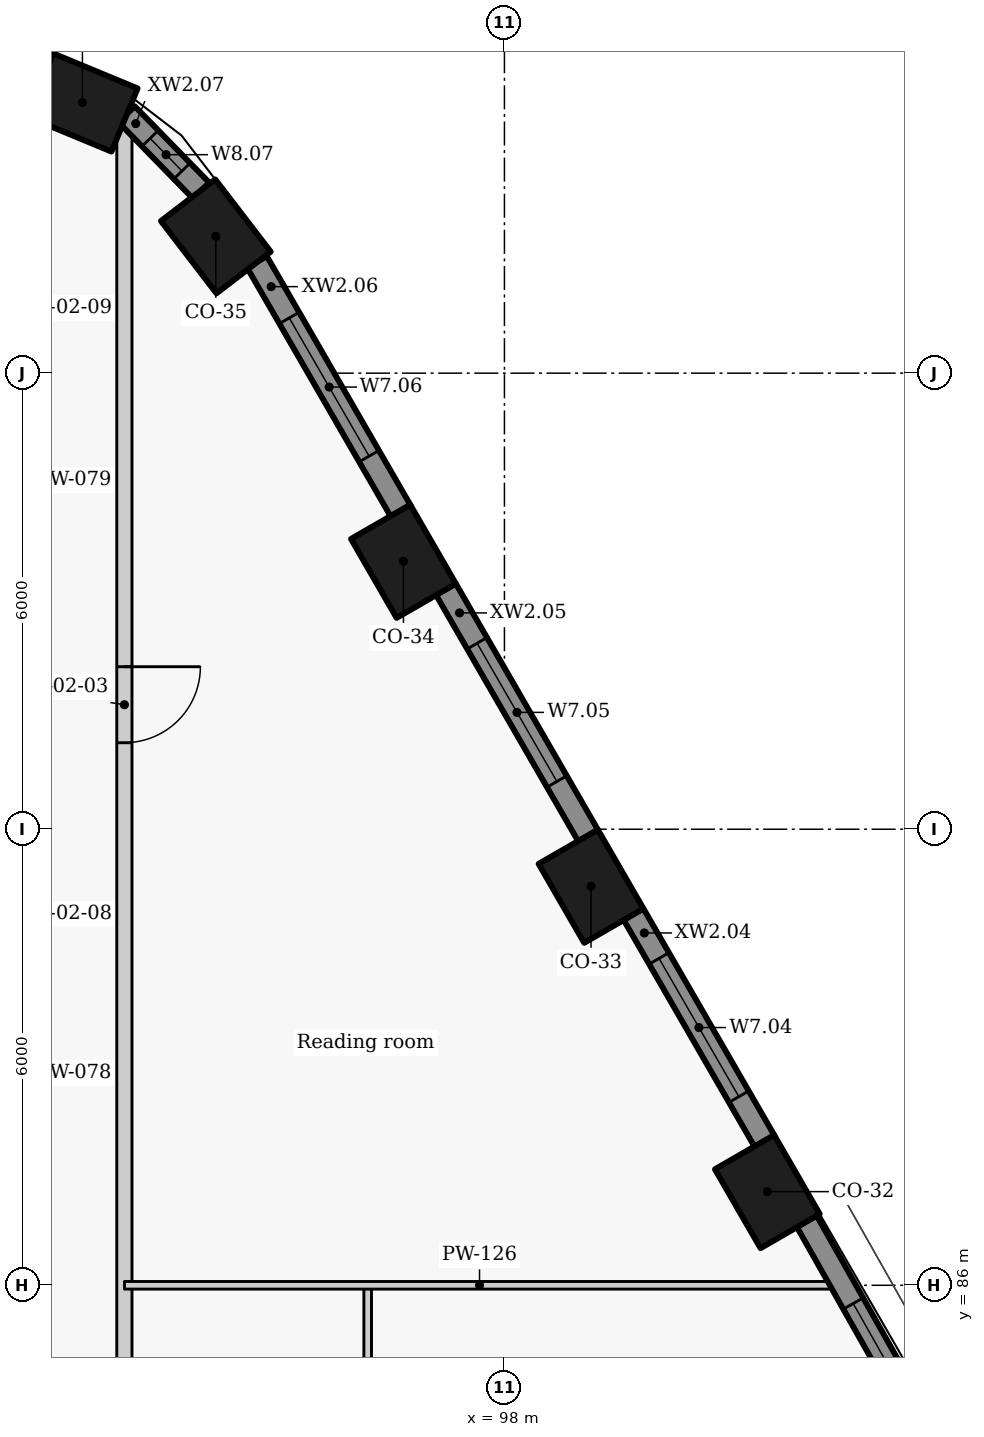
"""IFC4 building model, lengths in metres.
Left out: names, types, materials, properties, quantities, classifications, styles, units other than length and angle.
Written with IfcOpenShell. Run it as: python <this file> out.ifc"""

import sys

from ifc_helpers import new_model, si_unit, direction, frame, frame_2d, origin, origin_2d, place, context, subcontext, project, spatial, rectangle, extrude, element, fill, save


model = new_model("IFC4")
c1 = context("Model", 3, precision=1e-05, world=origin(), true_north=direction((0.0, 1.0)))
c2 = subcontext(c1, "Body", "Model", "MODEL_VIEW")
j1 = project(units=[si_unit("LENGTHUNIT", "METRE"), si_unit("PLANEANGLEUNIT", "RADIAN")], contexts=[c1])
p1 = place(None, origin())
s1 = spatial("IfcSite", under=j1, at=p1, CompositionType="ELEMENT")
p2 = place(p1, origin())
s2 = spatial("IfcBuilding", under=s1, at=p2, CompositionType="ELEMENT")
p3 = place(p2, frame((0.0, 0.0, 203.1)))
s3 = spatial("IfcBuildingStorey", under=s2, at=p3, CompositionType="ELEMENT", Elevation=203.1)
for number, where, z_axis, x_axis in (
    (1, (101.459, 87.232, 0.0), (0.0, 0.0, 1.0), (-0.5, 0.866, 0.0)),
    (2, (99.139, 91.25, 0.0), (0.0, 0.0, 1.0), (-0.5, 0.866, 0.0)),
    (3, (96.671, 95.525, 0.0), (0.0, 0.0, 1.0), (-0.5, 0.866, 0.0)),
    (4, (94.203, 99.8, 0.0), (0.0, 0.0, 1.0), (-0.609, 0.793, 0.0)),
    (5, (92.448, 101.56, 0.0), (0.0, 0.0, 1.0), (-0.924, 0.383, 0.0)),
):
    element("IfcColumn", number, at=place(p3, frame(where, z_axis=z_axis, x_axis=x_axis)), inside=s3, PredefinedType="COLUMN", context=c2, shape_type="SweptSolid", body=[
        extrude(rectangle(XDim=1.2, YDim=0.9, at=origin_2d()), origin(), (0.0, 0.0, 1.0), 3.3),
    ])
p4 = place(p3, frame((104.627, 82.154, 0.0), z_axis=(0.0, 0.0, 1.0), x_axis=(-0.492033360928, 0.870576344575, 0.0)))
e6 = element("IfcWall", 6, at=p4, inside=s3, PredefinedType="SOLIDWALL", context=c2, shape_type="SweptSolid", body=[
    extrude(rectangle(XDim=5.387, YDim=0.3, at=frame_2d((2.693, 0.0))), origin(), (0.0, 0.0, 1.0), 2.425),
])
p5 = place(p4, frame((2.043, 0.0, 0.9)))
e7 = element("IfcOpeningElement", 7, at=p5, cuts=e6, PredefinedType="OPENING", context=c2, shape_type="SweptSolid", body=[
    extrude(rectangle(XDim=2.1, YDim=1.1, at=frame_2d((1.05, 0.55))), frame((0.0, 0.16, 0.0), z_axis=(0.0, -1.0, 0.0), x_axis=(1.0, 0.0, 0.0)), (0.0, 0.0, 1.0), 0.32),
])
p6 = place(p3, frame((101.421, 87.898, 0.0), z_axis=(0.0, 0.0, 1.0), x_axis=(-0.499955427682, 0.866051136095, 0.0)))
e8 = element("IfcWall", 8, at=p6, inside=s3, PredefinedType="SOLIDWALL", context=c2, shape_type="SweptSolid", body=[
    extrude(rectangle(XDim=3.447, YDim=0.3, at=frame_2d((1.724, 0.0))), origin(), (0.0, 0.0, 1.0), 2.425),
])
p7 = place(p6, frame((0.674, 0.0, 0.9)))
e9 = element("IfcOpeningElement", 9, at=p7, cuts=e8, PredefinedType="OPENING", context=c2, shape_type="SweptSolid", body=[
    extrude(rectangle(XDim=2.1, YDim=1.1, at=frame_2d((1.05, 0.55))), frame((0.0, 0.16, 0.0), z_axis=(0.0, -1.0, 0.0), x_axis=(1.0, 0.0, 0.0)), (0.0, 0.0, 1.0), 0.32),
])
p8 = place(p3, frame((99.101, 91.916, 0.0), z_axis=(0.0, 0.0, 1.0), x_axis=(-0.500059225181, 0.86599120741, 0.0)))
e10 = element("IfcWall", 10, at=p8, inside=s3, PredefinedType="SOLIDWALL", context=c2, shape_type="SweptSolid", body=[
    extrude(rectangle(XDim=3.744, YDim=0.3, at=frame_2d((1.872, 0.0))), origin(), (0.0, 0.0, 1.0), 2.425),
])
p9 = place(p8, frame((0.822, 0.0, 0.9)))
e11 = element("IfcOpeningElement", 11, at=p9, cuts=e10, PredefinedType="OPENING", context=c2, shape_type="SweptSolid", body=[
    extrude(rectangle(XDim=2.1, YDim=1.1, at=frame_2d((1.05, 0.55))), frame((0.0, 0.16, 0.0), z_axis=(0.0, -1.0, 0.0), x_axis=(1.0, 0.0, 0.0)), (0.0, 0.0, 1.0), 0.32),
])
p10 = place(p3, frame((96.633, 96.191, 0.0), z_axis=(0.0, 0.0, 1.0), x_axis=(-0.499961087031, 0.866047869032, 0.0)))
e12 = element("IfcWall", 12, at=p10, inside=s3, PredefinedType="SOLIDWALL", context=c2, shape_type="SweptSolid", body=[
    extrude(rectangle(XDim=3.779, YDim=0.3, at=frame_2d((1.889, 0.0))), origin(), (0.0, 0.0, 1.0), 2.425),
])
p11 = place(p10, frame((0.828, 0.0, 0.9)))
e13 = element("IfcOpeningElement", 13, at=p11, cuts=e12, PredefinedType="OPENING", context=c2, shape_type="SweptSolid", body=[
    extrude(rectangle(XDim=2.1, YDim=1.1, at=frame_2d((1.05, 0.55))), frame((0.0, 0.16, 0.0), z_axis=(0.0, -1.0, 0.0), x_axis=(1.0, 0.0, 0.0)), (0.0, 0.0, 1.0), 0.32),
])
p12 = place(p3, frame((94.009, 100.402, 0.0), z_axis=(0.0, 0.0, 1.0), x_axis=(-0.69817596362, 0.715926199984, 0.0)))
e14 = element("IfcWall", 14, at=p12, inside=s3, PredefinedType="SOLIDWALL", context=c2, shape_type="SweptSolid", body=[
    extrude(rectangle(XDim=1.403, YDim=0.3, at=frame_2d((0.701, 0.0))), origin(), (0.0, 0.0, 1.0), 2.425),
])
p13 = place(p12, frame((0.36, 0.0, 0.9)))
e15 = element("IfcOpeningElement", 15, at=p13, cuts=e14, PredefinedType="OPENING", context=c2, shape_type="SweptSolid", body=[
    extrude(rectangle(XDim=0.6, YDim=1.1, at=frame_2d((0.3, 0.55))), frame((0.0, 0.16, 0.0), z_axis=(0.0, -1.0, 0.0), x_axis=(1.0, 0.0, 0.0)), (0.0, 0.0, 1.0), 0.32),
])
p14 = place(p3, frame((93.0, 101.281, 0.0), z_axis=(0.0, 0.0, 1.0), x_axis=(0.0, -1.0, 0.0)))
e16 = element("IfcWall", 16, at=p14, inside=s3, PredefinedType="PARTITIONING", context=c2, shape_type="SweptSolid", body=[
    extrude(rectangle(XDim=42.606, YDim=0.2, at=frame_2d((21.303, 0.0))), origin(), (0.0, 0.0, 1.0), 2.405),
])
p15 = place(p14, frame((39.33, 0.0, 0.0)))
e17 = element("IfcOpeningElement", 17, at=p15, cuts=e16, PredefinedType="OPENING", context=c2, shape_type="SweptSolid", body=[
    extrude(rectangle(XDim=1.0, YDim=2.1, at=frame_2d((0.5, 1.05))), frame((0.0, 0.11, 0.0), z_axis=(0.0, -1.0, 0.0), x_axis=(1.0, 0.0, 0.0)), (0.0, 0.0, 1.0), 0.22),
])
p16 = place(p14, frame((26.005, 0.0, 0.0)))
e18 = element("IfcOpeningElement", 18, at=p16, cuts=e16, PredefinedType="OPENING", context=c2, shape_type="SweptSolid", body=[
    extrude(rectangle(XDim=1.0, YDim=2.1, at=frame_2d((0.5, 1.05))), frame((0.0, 0.11, 0.0), z_axis=(0.0, -1.0, 0.0), x_axis=(1.0, 0.0, 0.0)), (0.0, 0.0, 1.0), 0.22),
])
p17 = place(p14, frame((7.143, 0.0, 0.0)))
e19 = element("IfcOpeningElement", 19, at=p17, cuts=e16, PredefinedType="OPENING", context=c2, shape_type="SweptSolid", body=[
    extrude(rectangle(XDim=1.0, YDim=2.1, at=frame_2d((0.5, 1.05))), frame((0.0, 0.11, 0.0), z_axis=(0.0, -1.0, 0.0), x_axis=(1.0, 0.0, 0.0)), (0.0, 0.0, 1.0), 0.22),
])
p18 = place(p3, frame((96.201, 83.525, 0.0), z_axis=(0.0, 0.0, 1.0), x_axis=(0.0, 1.0, 0.0)))
e20 = element("IfcWall", 20, at=p18, inside=s3, PredefinedType="PARTITIONING", context=c2, shape_type="SweptSolid", body=[
    extrude(rectangle(XDim=2.475, YDim=0.1, at=frame_2d((1.238, 0.0))), origin(), (0.0, 0.0, 1.0), 3.025),
])
p19 = place(p3, frame((93.001, 86.0, 0.0), z_axis=(0.0, 0.0, 1.0), x_axis=(1.0, 0.0, 0.0)))
e21 = element("IfcWall", 21, at=p19, inside=s3, PredefinedType="PARTITIONING", context=c2, shape_type="SweptSolid", body=[
    extrude(rectangle(XDim=9.342, YDim=0.1, at=frame_2d((4.671, 0.0))), origin(), (0.0, 0.0, 1.0), 2.405),
])
p20 = place(p5, origin())
e22 = element("IfcWindow", 22, at=p20, inside=s3, PartitioningType="SINGLE_PANEL", PredefinedType="WINDOW", context=c2, shape_type="SweptSolid", body=[
    extrude(rectangle(XDim=2.1, YDim=1.1, at=frame_2d((1.05, 0.55))), frame((0.0, 0.03, 0.0), z_axis=(0.0, -1.0, 0.0), x_axis=(1.0, 0.0, 0.0)), (0.0, 0.0, 1.0), 0.06),
])
fill(e7, e22)
p21 = place(p7, origin())
e23 = element("IfcWindow", 23, at=p21, inside=s3, PartitioningType="SINGLE_PANEL", PredefinedType="WINDOW", context=c2, shape_type="SweptSolid", body=[
    extrude(rectangle(XDim=2.1, YDim=1.1, at=frame_2d((1.05, 0.55))), frame((0.0, 0.03, 0.0), z_axis=(0.0, -1.0, 0.0), x_axis=(1.0, 0.0, 0.0)), (0.0, 0.0, 1.0), 0.06),
])
fill(e9, e23)
p22 = place(p9, origin())
e24 = element("IfcWindow", 24, at=p22, inside=s3, PartitioningType="SINGLE_PANEL", PredefinedType="WINDOW", context=c2, shape_type="SweptSolid", body=[
    extrude(rectangle(XDim=2.1, YDim=1.1, at=frame_2d((1.05, 0.55))), frame((0.0, 0.03, 0.0), z_axis=(0.0, -1.0, 0.0), x_axis=(1.0, 0.0, 0.0)), (0.0, 0.0, 1.0), 0.06),
])
fill(e11, e24)
p23 = place(p11, origin())
e25 = element("IfcWindow", 25, at=p23, inside=s3, PartitioningType="SINGLE_PANEL", PredefinedType="WINDOW", context=c2, shape_type="SweptSolid", body=[
    extrude(rectangle(XDim=2.1, YDim=1.1, at=frame_2d((1.05, 0.55))), frame((0.0, 0.03, 0.0), z_axis=(0.0, -1.0, 0.0), x_axis=(1.0, 0.0, 0.0)), (0.0, 0.0, 1.0), 0.06),
])
fill(e13, e25)
p24 = place(p13, origin())
e26 = element("IfcWindow", 26, at=p24, inside=s3, PartitioningType="SINGLE_PANEL", PredefinedType="WINDOW", context=c2, shape_type="SweptSolid", body=[
    extrude(rectangle(XDim=0.6, YDim=1.1, at=frame_2d((0.3, 0.55))), frame((0.0, 0.03, 0.0), z_axis=(0.0, -1.0, 0.0), x_axis=(1.0, 0.0, 0.0)), (0.0, 0.0, 1.0), 0.06),
])
fill(e15, e26)
p25 = place(p17, origin())
e27 = element("IfcDoor", 27, at=p25, inside=s3, OperationType="SINGLE_SWING_LEFT", PredefinedType="DOOR", context=c2, shape_type="SweptSolid", body=[
    extrude(rectangle(XDim=1.0, YDim=2.1, at=frame_2d((0.5, 1.05))), frame((0.0, 0.025, 0.0), z_axis=(0.0, -1.0, 0.0), x_axis=(1.0, 0.0, 0.0)), (0.0, 0.0, 1.0), 0.05),
])
fill(e19, e27)
save(model, sys.argv[1])
